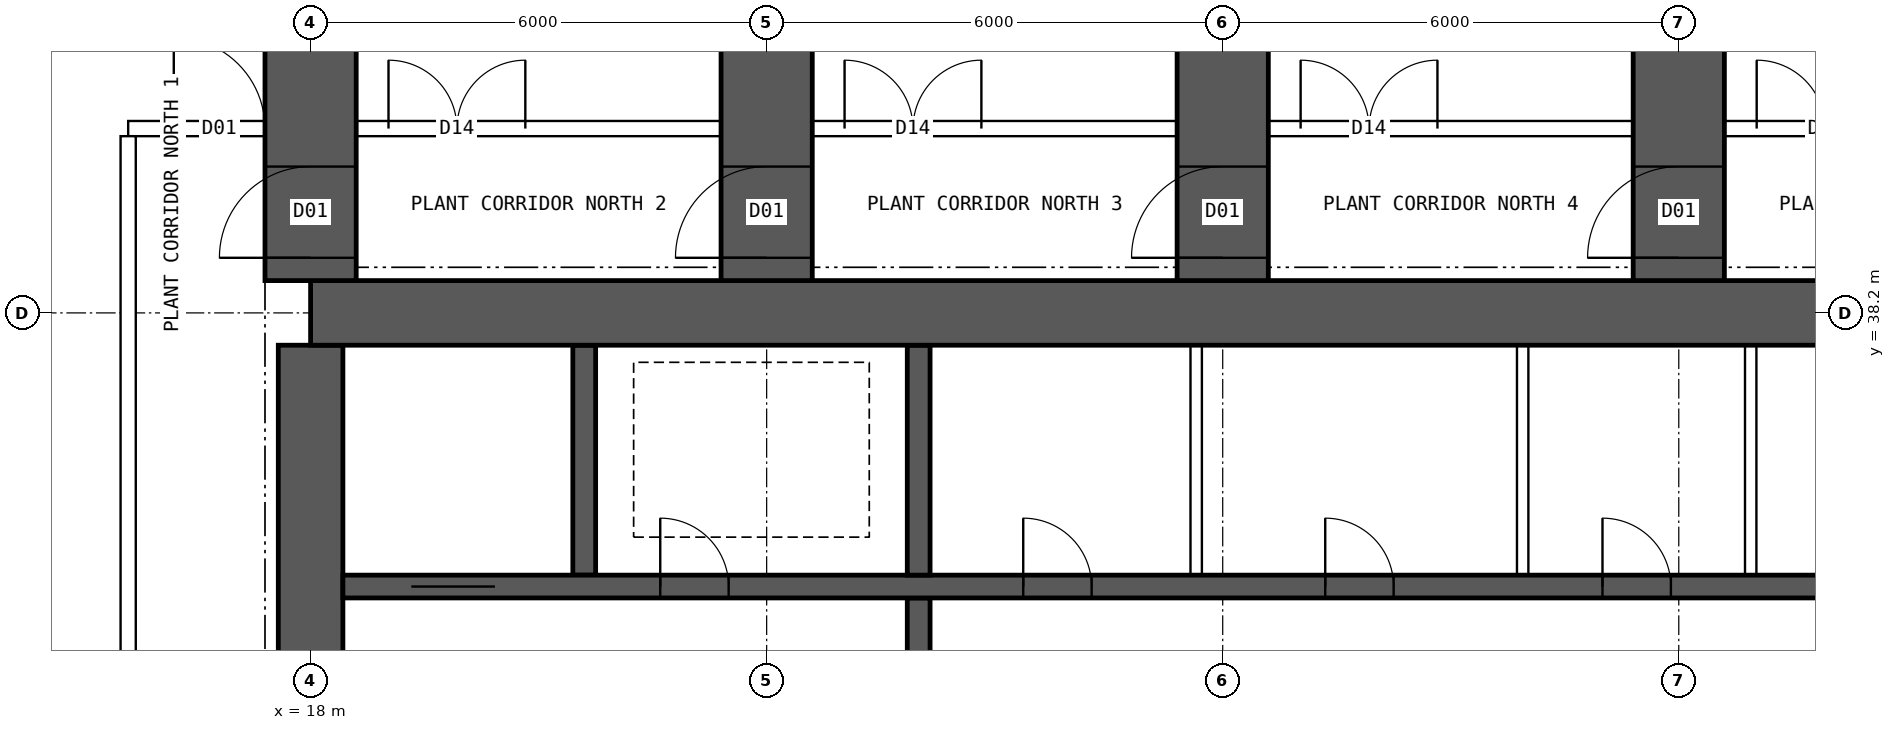
"""IFC4 building model, lengths in metres.
Left out: names, types, materials, properties, quantities, classifications, styles, units other than length and angle.
Written with IfcOpenShell. Run it as: python <this file> out.ifc"""

import sys

from ifc_helpers import new_model, si_unit, direction, frame, frame_2d, origin, place, context, subcontext, project, spatial, rectangle, extrude, element, fill, save


model = new_model("IFC4")
c1 = context("Model", 3, precision=1e-05, world=origin(), true_north=direction((0.0, 1.0)))
c2 = subcontext(c1, "Body", "Model", "MODEL_VIEW")
j1 = project(units=[si_unit("LENGTHUNIT", "METRE"), si_unit("PLANEANGLEUNIT", "RADIAN")], contexts=[c1])
p1 = place(None, origin())
s1 = spatial("IfcSite", under=j1, at=p1, CompositionType="ELEMENT")
p2 = place(p1, origin())
s2 = spatial("IfcBuilding", under=s1, at=p2, CompositionType="ELEMENT")
p3 = place(p2, frame((0.0, 0.0, 201.1)))
s3 = spatial("IfcBuildingStorey", under=s2, at=p3, CompositionType="ELEMENT", Elevation=201.1)
p4 = place(p3, frame((18.0, 38.2, 0.0), z_axis=(0.0, 0.0, 1.0), x_axis=(1.0, 0.0, 0.0)))
e1 = element("IfcWall", 1, at=p4, inside=s3, PredefinedType="SHEAR", context=c2, shape_type="SweptSolid", body=[
    extrude(rectangle(XDim=48.0, YDim=0.85, at=frame_2d((24.0, 0.0))), origin(), (0.0, 0.0, 1.0), 7.2),
])
p5 = place(p3, frame((18.0, 26.225, 0.0), z_axis=(0.0, 0.0, 1.0), x_axis=(0.0, 1.0, 0.0)))
e2 = element("IfcWall", 2, at=p5, inside=s3, PredefinedType="SHEAR", context=c2, shape_type="SweptSolid", body=[
    extrude(rectangle(XDim=11.55, YDim=0.85, at=frame_2d((5.775, 0.0))), origin(), (0.0, 0.0, 1.0), 7.2),
])
p6 = place(p5, frame((5.075, 0.0, 0.0)))
e3 = element("IfcOpeningElement", 3, at=p6, cuts=e2, PredefinedType="OPENING", context=c2, shape_type="SweptSolid", body=[
    extrude(rectangle(XDim=1.2, YDim=2.1, at=frame_2d((0.6, 1.05))), frame((0.0, 0.435, 0.0), z_axis=(0.0, -1.0, 0.0), x_axis=(1.0, 0.0, 0.0)), (0.0, 0.0, 1.0), 0.87),
])
p7 = place(p3, frame((18.425, 34.6, 0.0), z_axis=(0.0, 0.0, 1.0), x_axis=(1.0, 0.0, 0.0)))
e4 = element("IfcWall", 4, at=p7, inside=s3, PredefinedType="SHEAR", context=c2, shape_type="SweptSolid", body=[
    extrude(rectangle(XDim=47.15, YDim=0.3, at=frame_2d((23.575, 0.0))), origin(), (0.0, 0.0, 1.0), 7.2),
])
p8 = place(p7, frame((0.9, 0.0, 0.0)))
e5 = element("IfcOpeningElement", 5, at=p8, cuts=e4, PredefinedType="OPENING", context=c2, shape_type="SweptSolid", body=[
    extrude(rectangle(XDim=1.1, YDim=2.1, at=frame_2d((0.55, 1.05))), frame((0.0, 0.16, 0.0), z_axis=(0.0, -1.0, 0.0), x_axis=(1.0, 0.0, 0.0)), (0.0, 0.0, 1.0), 0.32),
])
p9 = place(p7, frame((45.15, 0.0, 0.0)))
e6 = element("IfcOpeningElement", 6, at=p9, cuts=e4, PredefinedType="OPENING", context=c2, shape_type="SweptSolid", body=[
    extrude(rectangle(XDim=1.1, YDim=2.1, at=frame_2d((0.55, 1.05))), frame((0.0, 0.16, 0.0), z_axis=(0.0, -1.0, 0.0), x_axis=(1.0, 0.0, 0.0)), (0.0, 0.0, 1.0), 0.32),
])
p10 = place(p7, frame((4.175, 0.0, 0.0)))
e7 = element("IfcOpeningElement", 7, at=p10, cuts=e4, PredefinedType="OPENING", context=c2, shape_type="SweptSolid", body=[
    extrude(rectangle(XDim=0.9, YDim=2.1, at=frame_2d((0.45, 1.05))), frame((0.0, 0.16, 0.0), z_axis=(0.0, -1.0, 0.0), x_axis=(1.0, 0.0, 0.0)), (0.0, 0.0, 1.0), 0.32),
])
p11 = place(p7, frame((42.075, 0.0, 0.0)))
e8 = element("IfcOpeningElement", 8, at=p11, cuts=e4, PredefinedType="OPENING", context=c2, shape_type="SweptSolid", body=[
    extrude(rectangle(XDim=0.9, YDim=2.1, at=frame_2d((0.45, 1.05))), frame((0.0, 0.16, 0.0), z_axis=(0.0, -1.0, 0.0), x_axis=(1.0, 0.0, 0.0)), (0.0, 0.0, 1.0), 0.32),
])
p12 = place(p7, frame((8.95, 0.0, 0.0)))
e9 = element("IfcOpeningElement", 9, at=p12, cuts=e4, PredefinedType="OPENING", context=c2, shape_type="SweptSolid", body=[
    extrude(rectangle(XDim=0.9, YDim=2.1, at=frame_2d((0.45, 1.05))), frame((0.0, 0.16, 0.0), z_axis=(0.0, -1.0, 0.0), x_axis=(1.0, 0.0, 0.0)), (0.0, 0.0, 1.0), 0.32),
])
p13 = place(p7, frame((12.924, 0.0, 0.0)))
e10 = element("IfcOpeningElement", 10, at=p13, cuts=e4, PredefinedType="OPENING", context=c2, shape_type="SweptSolid", body=[
    extrude(rectangle(XDim=0.9, YDim=2.1, at=frame_2d((0.45, 1.05))), frame((0.0, 0.16, 0.0), z_axis=(0.0, -1.0, 0.0), x_axis=(1.0, 0.0, 0.0)), (0.0, 0.0, 1.0), 0.32),
])
p14 = place(p7, frame((16.571, 0.0, 0.0)))
e11 = element("IfcOpeningElement", 11, at=p14, cuts=e4, PredefinedType="OPENING", context=c2, shape_type="SweptSolid", body=[
    extrude(rectangle(XDim=0.9, YDim=2.1, at=frame_2d((0.45, 1.05))), frame((0.0, 0.16, 0.0), z_axis=(0.0, -1.0, 0.0), x_axis=(1.0, 0.0, 0.0)), (0.0, 0.0, 1.0), 0.32),
])
p15 = place(p7, frame((20.33, 0.0, 0.0)))
e12 = element("IfcOpeningElement", 12, at=p15, cuts=e4, PredefinedType="OPENING", context=c2, shape_type="SweptSolid", body=[
    extrude(rectangle(XDim=0.9, YDim=2.1, at=frame_2d((0.45, 1.05))), frame((0.0, 0.16, 0.0), z_axis=(0.0, -1.0, 0.0), x_axis=(1.0, 0.0, 0.0)), (0.0, 0.0, 1.0), 0.32),
])
p16 = place(p7, frame((24.736, 0.0, 0.0)))
e13 = element("IfcOpeningElement", 13, at=p16, cuts=e4, PredefinedType="OPENING", context=c2, shape_type="SweptSolid", body=[
    extrude(rectangle(XDim=0.9, YDim=2.1, at=frame_2d((0.45, 1.05))), frame((0.0, 0.16, 0.0), z_axis=(0.0, -1.0, 0.0), x_axis=(1.0, 0.0, 0.0)), (0.0, 0.0, 1.0), 0.32),
])
p17 = place(p7, frame((27.533, 0.0, 0.0)))
e14 = element("IfcOpeningElement", 14, at=p17, cuts=e4, PredefinedType="OPENING", context=c2, shape_type="SweptSolid", body=[
    extrude(rectangle(XDim=0.9, YDim=2.1, at=frame_2d((0.45, 1.05))), frame((0.0, 0.16, 0.0), z_axis=(0.0, -1.0, 0.0), x_axis=(1.0, 0.0, 0.0)), (0.0, 0.0, 1.0), 0.32),
])
p18 = place(p7, frame((29.906, 0.0, 0.0)))
e15 = element("IfcOpeningElement", 15, at=p18, cuts=e4, PredefinedType="OPENING", context=c2, shape_type="SweptSolid", body=[
    extrude(rectangle(XDim=0.9, YDim=2.1, at=frame_2d((0.45, 1.05))), frame((0.0, 0.16, 0.0), z_axis=(0.0, -1.0, 0.0), x_axis=(1.0, 0.0, 0.0)), (0.0, 0.0, 1.0), 0.32),
])
p19 = place(p7, frame((35.376, 0.0, 0.0)))
e16 = element("IfcOpeningElement", 16, at=p19, cuts=e4, PredefinedType="OPENING", context=c2, shape_type="SweptSolid", body=[
    extrude(rectangle(XDim=0.9, YDim=2.1, at=frame_2d((0.45, 1.05))), frame((0.0, 0.16, 0.0), z_axis=(0.0, -1.0, 0.0), x_axis=(1.0, 0.0, 0.0)), (0.0, 0.0, 1.0), 0.32),
])
p20 = place(p3, frame((26.0, 30.55, 0.0), z_axis=(0.0, 0.0, 1.0), x_axis=(0.0, 1.0, 0.0)))
e17 = element("IfcWall", 17, at=p20, inside=s3, PredefinedType="SHEAR", context=c2, shape_type="SweptSolid", body=[
    extrude(rectangle(XDim=3.9, YDim=0.3, at=frame_2d((1.95, 0.0))), origin(), (0.0, 0.0, 1.0), 7.2),
])
p21 = place(p20, frame((1.4, 0.0, 0.0)))
e18 = element("IfcOpeningElement", 18, at=p21, cuts=e17, PredefinedType="OPENING", context=c2, shape_type="SweptSolid", body=[
    extrude(rectangle(XDim=1.2, YDim=2.1, at=frame_2d((0.6, 1.05))), frame((0.0, 0.16, 0.0), z_axis=(0.0, -1.0, 0.0), x_axis=(1.0, 0.0, 0.0)), (0.0, 0.0, 1.0), 0.32),
])
for number, where, z_axis, x_axis in (
    (19, (21.6, 34.75, 0.0), (0.0, 0.0, 1.0), (0.0, 1.0, 0.0)),
    (20, (26.0, 34.75, 0.0), (0.0, 0.0, 1.0), (0.0, 1.0, 0.0)),
):
    element("IfcWall", number, at=place(p3, frame(where, z_axis=z_axis, x_axis=x_axis)), inside=s3, PredefinedType="SHEAR", context=c2, shape_type="SweptSolid", body=[
        extrude(rectangle(XDim=3.025, YDim=0.3, at=frame_2d((1.512, 0.0))), origin(), (0.0, 0.0, 1.0), 7.2),
    ])
p22 = place(p3, frame((18.0, 38.625, 0.0), z_axis=(0.0, 0.0, 1.0), x_axis=(0.0, 1.0, 0.0)))
e21 = element("IfcWall", 21, at=p22, inside=s3, PredefinedType="SHEAR", context=c2, shape_type="SweptSolid", body=[
    extrude(rectangle(XDim=15.375, YDim=1.2, at=frame_2d((7.688, 0.0))), origin(), (0.0, 0.0, 1.0), 7.2),
])
p23 = place(p22, frame((0.3, 0.0, 0.0)))
e22 = element("IfcOpeningElement", 22, at=p23, cuts=e21, PredefinedType="OPENING", context=c2, shape_type="SweptSolid", body=[
    extrude(rectangle(XDim=1.2, YDim=2.1, at=frame_2d((0.6, 1.05))), frame((0.0, 0.61, 0.0), z_axis=(0.0, -1.0, 0.0), x_axis=(1.0, 0.0, 0.0)), (0.0, 0.0, 1.0), 1.22),
])
p24 = place(p22, frame((10.225, 0.0, 0.0)))
e23 = element("IfcOpeningElement", 23, at=p24, cuts=e21, PredefinedType="OPENING", context=c2, shape_type="SweptSolid", body=[
    extrude(rectangle(XDim=1.2, YDim=2.1, at=frame_2d((0.6, 1.05))), frame((0.0, 0.61, 0.0), z_axis=(0.0, -1.0, 0.0), x_axis=(1.0, 0.0, 0.0)), (0.0, 0.0, 1.0), 1.22),
])
p25 = place(p3, frame((24.0, 38.625, 0.0), z_axis=(0.0, 0.0, 1.0), x_axis=(0.0, 1.0, 0.0)))
e24 = element("IfcWall", 24, at=p25, inside=s3, PredefinedType="SHEAR", context=c2, shape_type="SweptSolid", body=[
    extrude(rectangle(XDim=15.375, YDim=1.2, at=frame_2d((7.688, 0.0))), origin(), (0.0, 0.0, 1.0), 7.2),
])
p26 = place(p25, frame((0.3, 0.0, 0.0)))
e25 = element("IfcOpeningElement", 25, at=p26, cuts=e24, PredefinedType="OPENING", context=c2, shape_type="SweptSolid", body=[
    extrude(rectangle(XDim=1.2, YDim=2.1, at=frame_2d((0.6, 1.05))), frame((0.0, 0.61, 0.0), z_axis=(0.0, -1.0, 0.0), x_axis=(1.0, 0.0, 0.0)), (0.0, 0.0, 1.0), 1.22),
])
p27 = place(p3, frame((30.0, 38.625, 0.0), z_axis=(0.0, 0.0, 1.0), x_axis=(0.0, 1.0, 0.0)))
e26 = element("IfcWall", 26, at=p27, inside=s3, PredefinedType="SHEAR", context=c2, shape_type="SweptSolid", body=[
    extrude(rectangle(XDim=15.375, YDim=1.2, at=frame_2d((7.688, 0.0))), origin(), (0.0, 0.0, 1.0), 7.2),
])
p28 = place(p27, frame((0.3, 0.0, 0.0)))
e27 = element("IfcOpeningElement", 27, at=p28, cuts=e26, PredefinedType="OPENING", context=c2, shape_type="SweptSolid", body=[
    extrude(rectangle(XDim=1.2, YDim=2.1, at=frame_2d((0.6, 1.05))), frame((0.0, 0.61, 0.0), z_axis=(0.0, -1.0, 0.0), x_axis=(1.0, 0.0, 0.0)), (0.0, 0.0, 1.0), 1.22),
])
p29 = place(p3, frame((36.0, 38.625, 0.0), z_axis=(0.0, 0.0, 1.0), x_axis=(0.0, 1.0, 0.0)))
e28 = element("IfcWall", 28, at=p29, inside=s3, PredefinedType="SHEAR", context=c2, shape_type="SweptSolid", body=[
    extrude(rectangle(XDim=15.375, YDim=1.2, at=frame_2d((7.688, 0.0))), origin(), (0.0, 0.0, 1.0), 7.2),
])
p30 = place(p29, frame((0.3, 0.0, 0.0)))
e29 = element("IfcOpeningElement", 29, at=p30, cuts=e28, PredefinedType="OPENING", context=c2, shape_type="SweptSolid", body=[
    extrude(rectangle(XDim=1.2, YDim=2.1, at=frame_2d((0.6, 1.05))), frame((0.0, 0.61, 0.0), z_axis=(0.0, -1.0, 0.0), x_axis=(1.0, 0.0, 0.0)), (0.0, 0.0, 1.0), 1.22),
])
for number, where, z_axis, x_axis in (
    (30, (29.651, 34.75, 0.0), (0.0, 0.0, 1.0), (0.0, 1.0, 0.0)),
    (31, (33.946, 34.75, 0.0), (0.0, 0.0, 1.0), (0.0, 1.0, 0.0)),
    (32, (36.946, 34.75, 0.0), (0.0, 0.0, 1.0), (0.0, 1.0, 0.0)),
):
    element("IfcWall", number, at=place(p3, frame(where, z_axis=z_axis, x_axis=x_axis)), inside=s3, PredefinedType="SOLIDWALL", context=c2, shape_type="SweptSolid", body=[
        extrude(rectangle(XDim=3.025, YDim=0.15, at=frame_2d((1.512, 0.0))), origin(), (0.0, 0.0, 1.0), 6.9),
    ])
p31 = place(p3, frame((15.6, 40.625, 0.0), z_axis=(0.0, 0.0, 1.0), x_axis=(1.0, 0.0, 0.0)))
e33 = element("IfcWall", 33, at=p31, inside=s3, PredefinedType="SOLIDWALL", context=c2, shape_type="SweptSolid", body=[
    extrude(rectangle(XDim=52.8, YDim=0.2, at=frame_2d((26.4, 0.0))), origin(), (0.0, 0.0, 1.0), 6.9),
])
p32 = place(p31, frame((0.6, 0.0, 0.0)))
e34 = element("IfcOpeningElement", 34, at=p32, cuts=e33, PredefinedType="OPENING", context=c2, shape_type="SweptSolid", body=[
    extrude(rectangle(XDim=1.2, YDim=2.1, at=frame_2d((0.6, 1.05))), frame((0.0, 0.11, 0.0), z_axis=(0.0, -1.0, 0.0), x_axis=(1.0, 0.0, 0.0)), (0.0, 0.0, 1.0), 0.22),
])
p33 = place(p31, frame((3.425, 0.0, 0.0)))
e35 = element("IfcOpeningElement", 35, at=p33, cuts=e33, PredefinedType="OPENING", context=c2, shape_type="SweptSolid", body=[
    extrude(rectangle(XDim=1.8, YDim=2.4, at=frame_2d((0.9, 1.2))), frame((0.0, 0.11, 0.0), z_axis=(0.0, -1.0, 0.0), x_axis=(1.0, 0.0, 0.0)), (0.0, 0.0, 1.0), 0.22),
])
p34 = place(p31, frame((9.425, 0.0, 0.0)))
e36 = element("IfcOpeningElement", 36, at=p34, cuts=e33, PredefinedType="OPENING", context=c2, shape_type="SweptSolid", body=[
    extrude(rectangle(XDim=1.8, YDim=2.4, at=frame_2d((0.9, 1.2))), frame((0.0, 0.11, 0.0), z_axis=(0.0, -1.0, 0.0), x_axis=(1.0, 0.0, 0.0)), (0.0, 0.0, 1.0), 0.22),
])
p35 = place(p31, frame((15.425, 0.0, 0.0)))
e37 = element("IfcOpeningElement", 37, at=p35, cuts=e33, PredefinedType="OPENING", context=c2, shape_type="SweptSolid", body=[
    extrude(rectangle(XDim=1.8, YDim=2.4, at=frame_2d((0.9, 1.2))), frame((0.0, 0.11, 0.0), z_axis=(0.0, -1.0, 0.0), x_axis=(1.0, 0.0, 0.0)), (0.0, 0.0, 1.0), 0.22),
])
p36 = place(p31, frame((21.425, 0.0, 0.0)))
e38 = element("IfcOpeningElement", 38, at=p36, cuts=e33, PredefinedType="OPENING", context=c2, shape_type="SweptSolid", body=[
    extrude(rectangle(XDim=1.8, YDim=2.4, at=frame_2d((0.9, 1.2))), frame((0.0, 0.11, 0.0), z_axis=(0.0, -1.0, 0.0), x_axis=(1.0, 0.0, 0.0)), (0.0, 0.0, 1.0), 0.22),
])
p37 = place(p31, frame((27.425, 0.0, 0.0)))
e39 = element("IfcOpeningElement", 39, at=p37, cuts=e33, PredefinedType="OPENING", context=c2, shape_type="SweptSolid", body=[
    extrude(rectangle(XDim=1.8, YDim=2.4, at=frame_2d((0.9, 1.2))), frame((0.0, 0.11, 0.0), z_axis=(0.0, -1.0, 0.0), x_axis=(1.0, 0.0, 0.0)), (0.0, 0.0, 1.0), 0.22),
])
p38 = place(p31, frame((33.425, 0.0, 0.0)))
e40 = element("IfcOpeningElement", 40, at=p38, cuts=e33, PredefinedType="OPENING", context=c2, shape_type="SweptSolid", body=[
    extrude(rectangle(XDim=1.8, YDim=2.4, at=frame_2d((0.9, 1.2))), frame((0.0, 0.11, 0.0), z_axis=(0.0, -1.0, 0.0), x_axis=(1.0, 0.0, 0.0)), (0.0, 0.0, 1.0), 0.22),
])
p39 = place(p31, frame((39.425, 0.0, 0.0)))
e41 = element("IfcOpeningElement", 41, at=p39, cuts=e33, PredefinedType="OPENING", context=c2, shape_type="SweptSolid", body=[
    extrude(rectangle(XDim=1.8, YDim=2.4, at=frame_2d((0.9, 1.2))), frame((0.0, 0.11, 0.0), z_axis=(0.0, -1.0, 0.0), x_axis=(1.0, 0.0, 0.0)), (0.0, 0.0, 1.0), 0.22),
])
p40 = place(p31, frame((45.425, 0.0, 0.0)))
e42 = element("IfcOpeningElement", 42, at=p40, cuts=e33, PredefinedType="OPENING", context=c2, shape_type="SweptSolid", body=[
    extrude(rectangle(XDim=1.8, YDim=2.4, at=frame_2d((0.9, 1.2))), frame((0.0, 0.11, 0.0), z_axis=(0.0, -1.0, 0.0), x_axis=(1.0, 0.0, 0.0)), (0.0, 0.0, 1.0), 0.22),
])
p41 = place(p31, frame((51.425, 0.0, 0.0)))
e43 = element("IfcOpeningElement", 43, at=p41, cuts=e33, PredefinedType="OPENING", context=c2, shape_type="SweptSolid", body=[
    extrude(rectangle(XDim=1.2, YDim=2.1, at=frame_2d((0.6, 1.05))), frame((0.0, 0.11, 0.0), z_axis=(0.0, -1.0, 0.0), x_axis=(1.0, 0.0, 0.0)), (0.0, 0.0, 1.0), 0.22),
])
p42 = place(p3, frame((15.6, 23.475, 0.0), z_axis=(0.0, 0.0, 1.0), x_axis=(0.0, 1.0, 0.0)))
e44 = element("IfcWall", 44, at=p42, inside=s3, PredefinedType="SOLIDWALL", context=c2, shape_type="SweptSolid", body=[
    extrude(rectangle(XDim=17.05, YDim=0.2, at=frame_2d((8.525, 0.0))), origin(), (0.0, 0.0, 1.0), 6.9),
])
p43 = place(p8, origin())
e45 = element("IfcDoor", 45, at=p43, inside=s3, OperationType="DOUBLE_DOOR_SLIDING", PredefinedType="DOOR", context=c2, shape_type="SweptSolid", body=[
    extrude(rectangle(XDim=1.1, YDim=2.1, at=frame_2d((0.55, 1.05))), frame((0.0, 0.025, 0.0), z_axis=(0.0, -1.0, 0.0), x_axis=(1.0, 0.0, 0.0)), (0.0, 0.0, 1.0), 0.05),
])
fill(e5, e45)
p44 = place(p10, origin())
e46 = element("IfcDoor", 46, at=p44, inside=s3, OperationType="SINGLE_SWING_LEFT", PredefinedType="DOOR", context=c2, shape_type="SweptSolid", body=[
    extrude(rectangle(XDim=0.9, YDim=2.1, at=frame_2d((0.45, 1.05))), frame((0.0, 0.025, 0.0), z_axis=(0.0, -1.0, 0.0), x_axis=(1.0, 0.0, 0.0)), (0.0, 0.0, 1.0), 0.05),
])
fill(e7, e46)
p45 = place(p12, origin())
e47 = element("IfcDoor", 47, at=p45, inside=s3, OperationType="SINGLE_SWING_LEFT", PredefinedType="DOOR", context=c2, shape_type="SweptSolid", body=[
    extrude(rectangle(XDim=0.9, YDim=2.1, at=frame_2d((0.45, 1.05))), frame((0.0, 0.025, 0.0), z_axis=(0.0, -1.0, 0.0), x_axis=(1.0, 0.0, 0.0)), (0.0, 0.0, 1.0), 0.05),
])
fill(e9, e47)
p46 = place(p13, origin())
e48 = element("IfcDoor", 48, at=p46, inside=s3, OperationType="SINGLE_SWING_LEFT", PredefinedType="DOOR", context=c2, shape_type="SweptSolid", body=[
    extrude(rectangle(XDim=0.9, YDim=2.1, at=frame_2d((0.45, 1.05))), frame((0.0, 0.025, 0.0), z_axis=(0.0, -1.0, 0.0), x_axis=(1.0, 0.0, 0.0)), (0.0, 0.0, 1.0), 0.05),
])
fill(e10, e48)
p47 = place(p14, origin())
e49 = element("IfcDoor", 49, at=p47, inside=s3, OperationType="SINGLE_SWING_LEFT", PredefinedType="DOOR", context=c2, shape_type="SweptSolid", body=[
    extrude(rectangle(XDim=0.9, YDim=2.1, at=frame_2d((0.45, 1.05))), frame((0.0, 0.025, 0.0), z_axis=(0.0, -1.0, 0.0), x_axis=(1.0, 0.0, 0.0)), (0.0, 0.0, 1.0), 0.05),
])
fill(e11, e49)
p48 = place(p32, origin())
e50 = element("IfcDoor", 50, at=p48, inside=s3, OperationType="SINGLE_SWING_LEFT", PredefinedType="DOOR", context=c2, shape_type="SweptSolid", body=[
    extrude(rectangle(XDim=1.2, YDim=2.1, at=frame_2d((0.6, 1.05))), frame((0.0, 0.025, 0.0), z_axis=(0.0, -1.0, 0.0), x_axis=(1.0, 0.0, 0.0)), (0.0, 0.0, 1.0), 0.05),
])
fill(e34, e50)
p49 = place(p33, origin())
e51 = element("IfcDoor", 51, at=p49, inside=s3, OperationType="DOUBLE_DOOR_SINGLE_SWING", PredefinedType="DOOR", context=c2, shape_type="SweptSolid", body=[
    extrude(rectangle(XDim=1.8, YDim=2.4, at=frame_2d((0.9, 1.2))), frame((0.0, 0.025, 0.0), z_axis=(0.0, -1.0, 0.0), x_axis=(1.0, 0.0, 0.0)), (0.0, 0.0, 1.0), 0.05),
])
fill(e35, e51)
p50 = place(p34, origin())
e52 = element("IfcDoor", 52, at=p50, inside=s3, OperationType="DOUBLE_DOOR_SINGLE_SWING", PredefinedType="DOOR", context=c2, shape_type="SweptSolid", body=[
    extrude(rectangle(XDim=1.8, YDim=2.4, at=frame_2d((0.9, 1.2))), frame((0.0, 0.025, 0.0), z_axis=(0.0, -1.0, 0.0), x_axis=(1.0, 0.0, 0.0)), (0.0, 0.0, 1.0), 0.05),
])
fill(e36, e52)
p51 = place(p35, origin())
e53 = element("IfcDoor", 53, at=p51, inside=s3, OperationType="DOUBLE_DOOR_SINGLE_SWING", PredefinedType="DOOR", context=c2, shape_type="SweptSolid", body=[
    extrude(rectangle(XDim=1.8, YDim=2.4, at=frame_2d((0.9, 1.2))), frame((0.0, 0.025, 0.0), z_axis=(0.0, -1.0, 0.0), x_axis=(1.0, 0.0, 0.0)), (0.0, 0.0, 1.0), 0.05),
])
fill(e37, e53)
p52 = place(p36, origin())
e54 = element("IfcDoor", 54, at=p52, inside=s3, OperationType="DOUBLE_DOOR_SINGLE_SWING", PredefinedType="DOOR", context=c2, shape_type="SweptSolid", body=[
    extrude(rectangle(XDim=1.8, YDim=2.4, at=frame_2d((0.9, 1.2))), frame((0.0, 0.025, 0.0), z_axis=(0.0, -1.0, 0.0), x_axis=(1.0, 0.0, 0.0)), (0.0, 0.0, 1.0), 0.05),
])
fill(e38, e54)
p53 = place(p23, origin())
e55 = element("IfcDoor", 55, at=p53, inside=s3, OperationType="SINGLE_SWING_LEFT", PredefinedType="DOOR", context=c2, shape_type="SweptSolid", body=[
    extrude(rectangle(XDim=1.2, YDim=2.1, at=frame_2d((0.6, 1.05))), frame((0.0, 0.025, 0.0), z_axis=(0.0, -1.0, 0.0), x_axis=(1.0, 0.0, 0.0)), (0.0, 0.0, 1.0), 0.05),
])
fill(e22, e55)
p54 = place(p26, origin())
e56 = element("IfcDoor", 56, at=p54, inside=s3, OperationType="SINGLE_SWING_LEFT", PredefinedType="DOOR", context=c2, shape_type="SweptSolid", body=[
    extrude(rectangle(XDim=1.2, YDim=2.1, at=frame_2d((0.6, 1.05))), frame((0.0, 0.025, 0.0), z_axis=(0.0, -1.0, 0.0), x_axis=(1.0, 0.0, 0.0)), (0.0, 0.0, 1.0), 0.05),
])
fill(e25, e56)
p55 = place(p28, origin())
e57 = element("IfcDoor", 57, at=p55, inside=s3, OperationType="SINGLE_SWING_LEFT", PredefinedType="DOOR", context=c2, shape_type="SweptSolid", body=[
    extrude(rectangle(XDim=1.2, YDim=2.1, at=frame_2d((0.6, 1.05))), frame((0.0, 0.025, 0.0), z_axis=(0.0, -1.0, 0.0), x_axis=(1.0, 0.0, 0.0)), (0.0, 0.0, 1.0), 0.05),
])
fill(e27, e57)
p56 = place(p30, origin())
e58 = element("IfcDoor", 58, at=p56, inside=s3, OperationType="SINGLE_SWING_LEFT", PredefinedType="DOOR", context=c2, shape_type="SweptSolid", body=[
    extrude(rectangle(XDim=1.2, YDim=2.1, at=frame_2d((0.6, 1.05))), frame((0.0, 0.025, 0.0), z_axis=(0.0, -1.0, 0.0), x_axis=(1.0, 0.0, 0.0)), (0.0, 0.0, 1.0), 0.05),
])
fill(e29, e58)
save(model, sys.argv[1])
